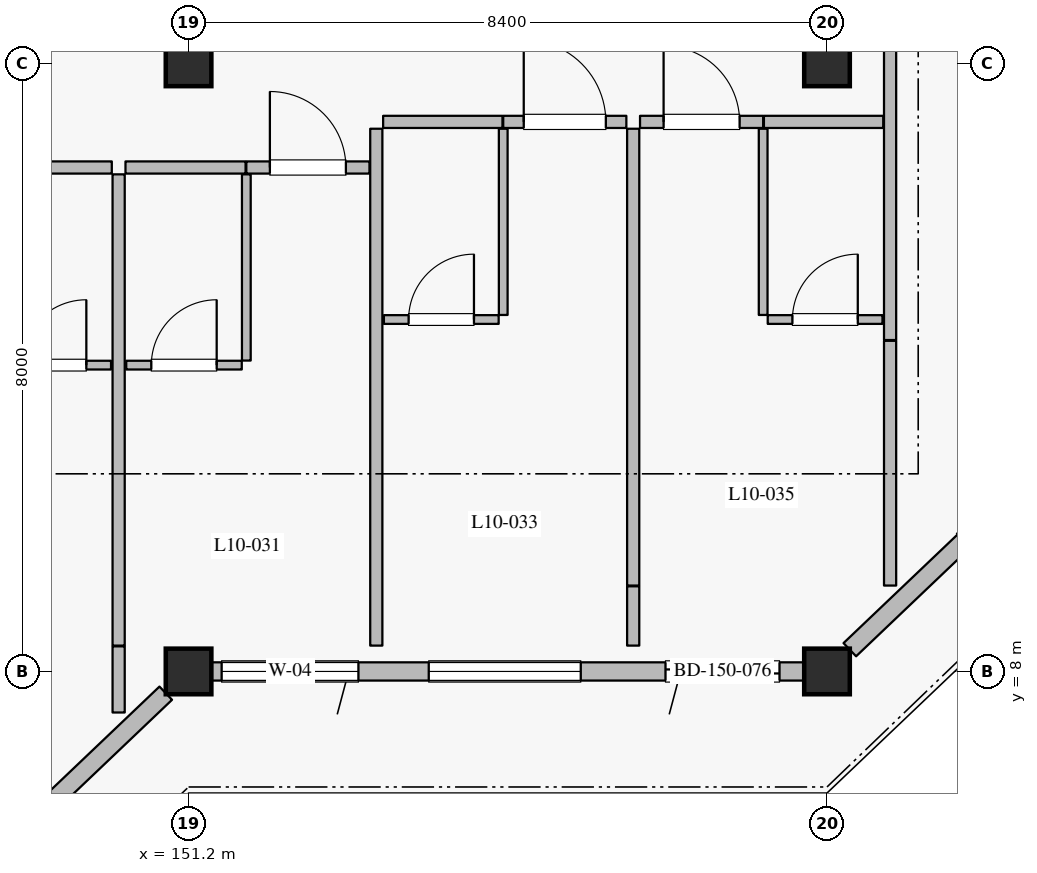
"""IFC4 building model, lengths in metres.
Left out: names, types, materials, properties, quantities, classifications, styles, units other than length and angle.
Written with IfcOpenShell. Run it as: python <this file> out.ifc"""

import sys

from ifc_helpers import new_model, si_unit, direction, frame, frame_2d, origin, origin_2d, place, context, subcontext, project, spatial, rectangle, extrude, element, fill, save


model = new_model("IFC4")
c1 = context("Model", 3, precision=1e-05, world=origin(), true_north=direction((0.0, 1.0)))
c2 = subcontext(c1, "Body", "Model", "MODEL_VIEW")
j1 = project(units=[si_unit("LENGTHUNIT", "METRE"), si_unit("PLANEANGLEUNIT", "RADIAN")], contexts=[c1])
p1 = place(None, origin())
s1 = spatial("IfcSite", under=j1, at=p1, CompositionType="ELEMENT")
p2 = place(p1, origin())
s2 = spatial("IfcBuilding", under=s1, at=p2, CompositionType="ELEMENT")
p3 = place(p2, frame((0.0, 0.0, 43.2)))
s3 = spatial("IfcBuildingStorey", under=s2, at=p3, CompositionType="ELEMENT", Elevation=43.2)
for number, where, z_axis, x_axis in (
    (1, (151.2, 8.0, 0.0), (0.0, 0.0, 1.0), (1.0, 0.0, 0.0)),
    (2, (159.6, 8.0, 0.0), (0.0, 0.0, 1.0), (1.0, 0.0, 0.0)),
    (3, (151.2, 16.0, 0.0), (0.0, 0.0, 1.0), (1.0, 0.0, 0.0)),
    (4, (159.6, 16.0, 0.0), (0.0, 0.0, 1.0), (1.0, 0.0, 0.0)),
):
    element("IfcColumn", number, at=place(p3, frame(where, z_axis=z_axis, x_axis=x_axis)), inside=s3, PredefinedType="COLUMN", context=c2, shape_type="SweptSolid", body=[
        extrude(rectangle(XDim=0.6, YDim=0.6, at=origin_2d()), origin(), (0.0, 0.0, 1.0), 4.2),
    ])
p4 = place(p3, frame((150.9, 7.714, 0.0), z_axis=(0.0, 0.0, 1.0), x_axis=(-0.724145477467, -0.689647248573, 0.0)))
e5 = element("IfcWall", 5, at=p4, inside=s3, PredefinedType="SOLIDWALL", context=c2, shape_type="SweptSolid", body=[
    extrude(rectangle(XDim=10.771, YDim=0.24, at=frame_2d((5.385, 0.0))), origin(), (0.0, 0.0, 1.0), 3.54),
])
p5 = place(p4, frame((2.44, 0.0, 0.0)))
e6 = element("IfcOpeningElement", 6, at=p5, cuts=e5, PredefinedType="OPENING", context=c2, shape_type="SweptSolid", body=[
    extrude(rectangle(XDim=1.5, YDim=2.25, at=frame_2d((0.75, 1.125))), frame((0.0, 0.13, 0.0), z_axis=(0.0, -1.0, 0.0), x_axis=(1.0, 0.0, 0.0)), (0.0, 0.0, 1.0), 0.26),
])
p6 = place(p4, frame((6.857, 0.0, 0.8)))
e7 = element("IfcOpeningElement", 7, at=p6, cuts=e5, PredefinedType="OPENING", context=c2, shape_type="SweptSolid", body=[
    extrude(rectangle(XDim=2.0, YDim=1.75, at=frame_2d((1.0, 0.875))), frame((0.0, 0.13, 0.0), z_axis=(0.0, -1.0, 0.0), x_axis=(1.0, 0.0, 0.0)), (0.0, 0.0, 1.0), 0.26),
])
p7 = place(p3, frame((159.3, 8.0, 0.0), z_axis=(0.0, 0.0, 1.0), x_axis=(-1.0, 0.0, 0.0)))
e8 = element("IfcWall", 8, at=p7, inside=s3, PredefinedType="SOLIDWALL", context=c2, shape_type="SweptSolid", body=[
    extrude(rectangle(XDim=7.8, YDim=0.24, at=frame_2d((3.9, 0.0))), origin(), (0.0, 0.0, 1.0), 3.49),
])
p8 = place(p7, frame((0.325, 0.0, 0.0)))
e9 = element("IfcOpeningElement", 9, at=p8, cuts=e8, PredefinedType="OPENING", context=c2, shape_type="SweptSolid", body=[
    extrude(rectangle(XDim=1.5, YDim=2.25, at=frame_2d((0.75, 1.125))), frame((0.0, 0.13, 0.0), z_axis=(0.0, -1.0, 0.0), x_axis=(1.0, 0.0, 0.0)), (0.0, 0.0, 1.0), 0.26),
])
p9 = place(p7, frame((2.94, 0.0, 0.8)))
e10 = element("IfcOpeningElement", 10, at=p9, cuts=e8, PredefinedType="OPENING", context=c2, shape_type="SweptSolid", body=[
    extrude(rectangle(XDim=2.0, YDim=1.75, at=frame_2d((1.0, 0.875))), frame((0.0, 0.13, 0.0), z_axis=(0.0, -1.0, 0.0), x_axis=(1.0, 0.0, 0.0)), (0.0, 0.0, 1.0), 0.26),
])
p10 = place(p7, frame((5.865, 0.0, 0.8)))
e11 = element("IfcOpeningElement", 11, at=p10, cuts=e8, PredefinedType="OPENING", context=c2, shape_type="SweptSolid", body=[
    extrude(rectangle(XDim=1.8, YDim=1.7, at=frame_2d((0.9, 0.85))), frame((0.0, 0.13, 0.0), z_axis=(0.0, -1.0, 0.0), x_axis=(1.0, 0.0, 0.0)), (0.0, 0.0, 1.0), 0.26),
])
p11 = place(p3, frame((167.7, 15.714, 0.0), z_axis=(0.0, 0.0, 1.0), x_axis=(-0.724156257633, -0.689635928973, 0.0)))
e12 = element("IfcWall", 12, at=p11, inside=s3, PredefinedType="SOLIDWALL", context=c2, shape_type="SweptSolid", body=[
    extrude(rectangle(XDim=10.771, YDim=0.24, at=frame_2d((5.386, 0.0))), origin(), (0.0, 0.0, 1.0), 3.49),
])
p12 = place(p11, frame((2.274, 0.0, 0.0)))
e13 = element("IfcOpeningElement", 13, at=p12, cuts=e12, PredefinedType="OPENING", context=c2, shape_type="SweptSolid", body=[
    extrude(rectangle(XDim=1.5, YDim=2.25, at=frame_2d((0.75, 1.125))), frame((0.0, 0.13, 0.0), z_axis=(0.0, -1.0, 0.0), x_axis=(1.0, 0.0, 0.0)), (0.0, 0.0, 1.0), 0.26),
])
p13 = place(p11, frame((6.699, 0.0, 0.8)))
e14 = element("IfcOpeningElement", 14, at=p13, cuts=e12, PredefinedType="OPENING", context=c2, shape_type="SweptSolid", body=[
    extrude(rectangle(XDim=2.0, YDim=1.75, at=frame_2d((1.0, 0.875))), frame((0.0, 0.13, 0.0), z_axis=(0.0, -1.0, 0.0), x_axis=(1.0, 0.0, 0.0)), (0.0, 0.0, 1.0), 0.26),
])
p14 = place(p3, frame((148.62, 14.63, 0.0), z_axis=(0.0, 0.0, 1.0), x_axis=(1.0, 0.0, 0.0)))
e15 = element("IfcWall", 15, at=p14, inside=s3, PredefinedType="PARTITIONING", context=c2, shape_type="SweptSolid", body=[
    extrude(rectangle(XDim=1.57, YDim=0.16, at=frame_2d((0.785, 0.0))), origin(), (0.0, 0.0, 1.0), 3.935),
])
p15 = place(p3, frame((148.67, 12.03, 0.0), z_axis=(0.0, 0.0, 1.0), x_axis=(1.0, 0.0, 0.0)))
e16 = element("IfcWall", 16, at=p15, inside=s3, PredefinedType="PARTITIONING", context=c2, shape_type="SweptSolid", body=[
    extrude(rectangle(XDim=1.51, YDim=0.115, at=frame_2d((0.755, 0.0))), origin(), (0.0, 0.0, 1.0), 3.935),
])
p16 = place(p15, frame((0.325, 0.0, 0.0)))
e17 = element("IfcOpeningElement", 17, at=p16, cuts=e16, PredefinedType="OPENING", context=c2, shape_type="SweptSolid", body=[
    extrude(rectangle(XDim=0.86, YDim=2.12, at=frame_2d((0.43, 1.06))), frame((0.0, 0.067, 0.0), z_axis=(0.0, -1.0, 0.0), x_axis=(1.0, 0.0, 0.0)), (0.0, 0.0, 1.0), 0.135),
])
p17 = place(p3, frame((150.28, 7.46, 0.0), z_axis=(0.0, 0.0, 1.0), x_axis=(0.0, 1.0, 0.0)))
e18 = element("IfcWall", 18, at=p17, inside=s3, PredefinedType="PARTITIONING", context=c2, shape_type="SweptSolid", body=[
    extrude(rectangle(XDim=0.87, YDim=0.16, at=frame_2d((0.435, 0.0))), origin(), (0.0, 0.0, 1.0), 3.935),
])
p18 = place(p3, frame((150.37, 14.63, 0.0), z_axis=(0.0, 0.0, 1.0), x_axis=(1.0, 0.0, 0.0)))
e19 = element("IfcWall", 19, at=p18, inside=s3, PredefinedType="PARTITIONING", context=c2, shape_type="SweptSolid", body=[
    extrude(rectangle(XDim=1.58, YDim=0.16, at=frame_2d((0.79, 0.0))), origin(), (0.0, 0.0, 1.0), 3.935),
])
p19 = place(p3, frame((151.96, 14.63, 0.0), z_axis=(0.0, 0.0, 1.0), x_axis=(1.0, 0.0, 0.0)))
e20 = element("IfcWall", 20, at=p19, inside=s3, PredefinedType="PARTITIONING", context=c2, shape_type="SweptSolid", body=[
    extrude(rectangle(XDim=1.62, YDim=0.16, at=frame_2d((0.81, 0.0))), origin(), (0.0, 0.0, 1.0), 3.935),
])
p20 = place(p19, frame((0.31, 0.0, 0.0)))
e21 = element("IfcOpeningElement", 21, at=p20, cuts=e20, PredefinedType="OPENING", context=c2, shape_type="SweptSolid", body=[
    extrude(rectangle(XDim=1.0, YDim=2.25, at=frame_2d((0.5, 1.125))), frame((0.0, 0.09, 0.0), z_axis=(0.0, -1.0, 0.0), x_axis=(1.0, 0.0, 0.0)), (0.0, 0.0, 1.0), 0.18),
])
p21 = place(p3, frame((151.96, 12.09, 0.0), z_axis=(0.0, 0.0, 1.0), x_axis=(0.0, 1.0, 0.0)))
e22 = element("IfcWall", 22, at=p21, inside=s3, PredefinedType="PARTITIONING", context=c2, shape_type="SweptSolid", body=[
    extrude(rectangle(XDim=2.45, YDim=0.115, at=frame_2d((1.225, 0.0))), origin(), (0.0, 0.0, 1.0), 3.935),
])
p22 = place(p3, frame((150.38, 12.03, 0.0), z_axis=(0.0, 0.0, 1.0), x_axis=(1.0, 0.0, 0.0)))
e23 = element("IfcWall", 23, at=p22, inside=s3, PredefinedType="PARTITIONING", context=c2, shape_type="SweptSolid", body=[
    extrude(rectangle(XDim=1.52, YDim=0.115, at=frame_2d((0.76, 0.0))), origin(), (0.0, 0.0, 1.0), 3.935),
])
p23 = place(p22, frame((0.33, 0.0, 0.0)))
e24 = element("IfcOpeningElement", 24, at=p23, cuts=e23, PredefinedType="OPENING", context=c2, shape_type="SweptSolid", body=[
    extrude(rectangle(XDim=0.86, YDim=2.12, at=frame_2d((0.43, 1.06))), frame((0.0, 0.067, 0.0), z_axis=(0.0, -1.0, 0.0), x_axis=(1.0, 0.0, 0.0)), (0.0, 0.0, 1.0), 0.135),
])
p24 = place(p3, frame((150.28, 8.34, 0.0), z_axis=(0.0, 0.0, 1.0), x_axis=(0.0, 1.0, 0.0)))
e25 = element("IfcWall", 25, at=p24, inside=s3, PredefinedType="PARTITIONING", context=c2, shape_type="SweptSolid", body=[
    extrude(rectangle(XDim=6.2, YDim=0.16, at=frame_2d((3.1, 0.0))), origin(), (0.0, 0.0, 1.0), 3.935),
])
p25 = place(p3, frame((153.76, 15.23, 0.0), z_axis=(0.0, 0.0, 1.0), x_axis=(1.0, 0.0, 0.0)))
e26 = element("IfcWall", 26, at=p25, inside=s3, PredefinedType="PARTITIONING", context=c2, shape_type="SweptSolid", body=[
    extrude(rectangle(XDim=1.57, YDim=0.16, at=frame_2d((0.785, 0.0))), origin(), (0.0, 0.0, 1.0), 3.935),
])
p26 = place(p3, frame((155.34, 15.23, 0.0), z_axis=(0.0, 0.0, 1.0), x_axis=(1.0, 0.0, 0.0)))
e27 = element("IfcWall", 27, at=p26, inside=s3, PredefinedType="PARTITIONING", context=c2, shape_type="SweptSolid", body=[
    extrude(rectangle(XDim=1.62, YDim=0.16, at=frame_2d((0.81, 0.0))), origin(), (0.0, 0.0, 1.0), 3.935),
])
p27 = place(p26, frame((0.27, 0.0, 0.0)))
e28 = element("IfcOpeningElement", 28, at=p27, cuts=e27, PredefinedType="OPENING", context=c2, shape_type="SweptSolid", body=[
    extrude(rectangle(XDim=1.08, YDim=2.3, at=frame_2d((0.54, 1.15))), frame((0.0, 0.09, 0.0), z_axis=(0.0, -1.0, 0.0), x_axis=(1.0, 0.0, 0.0)), (0.0, 0.0, 1.0), 0.18),
])
p28 = place(p3, frame((155.34, 12.69, 0.0), z_axis=(0.0, 0.0, 1.0), x_axis=(0.0, 1.0, 0.0)))
e29 = element("IfcWall", 29, at=p28, inside=s3, PredefinedType="PARTITIONING", context=c2, shape_type="SweptSolid", body=[
    extrude(rectangle(XDim=2.45, YDim=0.115, at=frame_2d((1.225, 0.0))), origin(), (0.0, 0.0, 1.0), 3.935),
])
p29 = place(p3, frame((153.77, 12.63, 0.0), z_axis=(0.0, 0.0, 1.0), x_axis=(1.0, 0.0, 0.0)))
e30 = element("IfcWall", 30, at=p29, inside=s3, PredefinedType="PARTITIONING", context=c2, shape_type="SweptSolid", body=[
    extrude(rectangle(XDim=1.51, YDim=0.115, at=frame_2d((0.755, 0.0))), origin(), (0.0, 0.0, 1.0), 3.935),
])
p30 = place(p29, frame((0.325, 0.0, 0.0)))
e31 = element("IfcOpeningElement", 31, at=p30, cuts=e30, PredefinedType="OPENING", context=c2, shape_type="SweptSolid", body=[
    extrude(rectangle(XDim=0.86, YDim=2.12, at=frame_2d((0.43, 1.06))), frame((0.0, 0.067, 0.0), z_axis=(0.0, -1.0, 0.0), x_axis=(1.0, 0.0, 0.0)), (0.0, 0.0, 1.0), 0.135),
])
p31 = place(p3, frame((153.67, 8.34, 0.0), z_axis=(0.0, 0.0, 1.0), x_axis=(0.0, 1.0, 0.0)))
e32 = element("IfcWall", 32, at=p31, inside=s3, PredefinedType="PARTITIONING", context=c2, shape_type="SweptSolid", body=[
    extrude(rectangle(XDim=6.8, YDim=0.16, at=frame_2d((3.4, 0.0))), origin(), (0.0, 0.0, 1.0), 3.935),
])
p32 = place(p3, frame((157.05, 8.34, 0.0), z_axis=(0.0, 0.0, 1.0), x_axis=(0.0, 1.0, 0.0)))
e33 = element("IfcWall", 33, at=p32, inside=s3, PredefinedType="PARTITIONING", context=c2, shape_type="SweptSolid", body=[
    extrude(rectangle(XDim=0.78, YDim=0.16, at=frame_2d((0.39, 0.0))), origin(), (0.0, 0.0, 1.0), 3.935),
])
p33 = place(p3, frame((157.14, 15.23, 0.0), z_axis=(0.0, 0.0, 1.0), x_axis=(1.0, 0.0, 0.0)))
e34 = element("IfcWall", 34, at=p33, inside=s3, PredefinedType="PARTITIONING", context=c2, shape_type="SweptSolid", body=[
    extrude(rectangle(XDim=1.62, YDim=0.16, at=frame_2d((0.81, 0.0))), origin(), (0.0, 0.0, 1.0), 3.935),
])
p34 = place(p33, frame((0.31, 0.0, 0.0)))
e35 = element("IfcOpeningElement", 35, at=p34, cuts=e34, PredefinedType="OPENING", context=c2, shape_type="SweptSolid", body=[
    extrude(rectangle(XDim=1.0, YDim=2.25, at=frame_2d((0.5, 1.125))), frame((0.0, 0.09, 0.0), z_axis=(0.0, -1.0, 0.0), x_axis=(1.0, 0.0, 0.0)), (0.0, 0.0, 1.0), 0.18),
])
p35 = place(p3, frame((158.77, 15.23, 0.0), z_axis=(0.0, 0.0, 1.0), x_axis=(1.0, 0.0, 0.0)))
e36 = element("IfcWall", 36, at=p35, inside=s3, PredefinedType="PARTITIONING", context=c2, shape_type="SweptSolid", body=[
    extrude(rectangle(XDim=1.57, YDim=0.16, at=frame_2d((0.785, 0.0))), origin(), (0.0, 0.0, 1.0), 3.935),
])
p36 = place(p3, frame((158.76, 12.69, 0.0), z_axis=(0.0, 0.0, 1.0), x_axis=(0.0, 1.0, 0.0)))
e37 = element("IfcWall", 37, at=p36, inside=s3, PredefinedType="PARTITIONING", context=c2, shape_type="SweptSolid", body=[
    extrude(rectangle(XDim=2.45, YDim=0.115, at=frame_2d((1.225, 0.0))), origin(), (0.0, 0.0, 1.0), 3.935),
])
p37 = place(p3, frame((158.82, 12.63, 0.0), z_axis=(0.0, 0.0, 1.0), x_axis=(1.0, 0.0, 0.0)))
e38 = element("IfcWall", 38, at=p37, inside=s3, PredefinedType="PARTITIONING", context=c2, shape_type="SweptSolid", body=[
    extrude(rectangle(XDim=1.51, YDim=0.115, at=frame_2d((0.755, 0.0))), origin(), (0.0, 0.0, 1.0), 3.935),
])
p38 = place(p37, frame((0.325, 0.0, 0.0)))
e39 = element("IfcOpeningElement", 39, at=p38, cuts=e38, PredefinedType="OPENING", context=c2, shape_type="SweptSolid", body=[
    extrude(rectangle(XDim=0.86, YDim=2.12, at=frame_2d((0.43, 1.06))), frame((0.0, 0.067, 0.0), z_axis=(0.0, -1.0, 0.0), x_axis=(1.0, 0.0, 0.0)), (0.0, 0.0, 1.0), 0.135),
])
p39 = place(p3, frame((157.05, 9.13, 0.0), z_axis=(0.0, 0.0, 1.0), x_axis=(0.0, 1.0, 0.0)))
e40 = element("IfcWall", 40, at=p39, inside=s3, PredefinedType="PARTITIONING", context=c2, shape_type="SweptSolid", body=[
    extrude(rectangle(XDim=6.01, YDim=0.16, at=frame_2d((3.005, 0.0))), origin(), (0.0, 0.0, 1.0), 3.935),
])
p40 = place(p3, frame((160.43, 9.13, 0.0), z_axis=(0.0, 0.0, 1.0), x_axis=(0.0, 1.0, 0.0)))
e41 = element("IfcWall", 41, at=p40, inside=s3, PredefinedType="PARTITIONING", context=c2, shape_type="SweptSolid", body=[
    extrude(rectangle(XDim=3.22, YDim=0.16, at=frame_2d((1.61, 0.0))), origin(), (0.0, 0.0, 1.0), 3.935),
])
p41 = place(p3, frame((160.43, 12.36, 0.0), z_axis=(0.0, 0.0, 1.0), x_axis=(0.0, 1.0, 0.0)))
e42 = element("IfcWall", 42, at=p41, inside=s3, PredefinedType="PARTITIONING", context=c2, shape_type="SweptSolid", body=[
    extrude(rectangle(XDim=9.55, YDim=0.16, at=frame_2d((4.775, 0.0))), origin(), (0.0, 0.0, 1.0), 3.935),
])
p42 = place(p8, origin())
e43 = element("IfcDoor", 43, at=p42, inside=s3, OperationType="SLIDING_TO_LEFT", PredefinedType="DOOR", context=c2, shape_type="SweptSolid", body=[
    extrude(rectangle(XDim=1.5, YDim=2.25, at=frame_2d((0.75, 1.125))), frame((0.0, 0.025, 0.0), z_axis=(0.0, -1.0, 0.0), x_axis=(1.0, 0.0, 0.0)), (0.0, 0.0, 1.0), 0.05),
])
fill(e9, e43)
p43 = place(p9, origin())
e44 = element("IfcWindow", 44, at=p43, inside=s3, PartitioningType="DOUBLE_PANEL_VERTICAL", PredefinedType="WINDOW", context=c2, shape_type="SweptSolid", body=[
    extrude(rectangle(XDim=2.0, YDim=1.75, at=frame_2d((1.0, 0.875))), frame((0.0, 0.03, 0.0), z_axis=(0.0, -1.0, 0.0), x_axis=(1.0, 0.0, 0.0)), (0.0, 0.0, 1.0), 0.06),
])
fill(e10, e44)
p44 = place(p10, origin())
e45 = element("IfcWindow", 45, at=p44, inside=s3, PartitioningType="DOUBLE_PANEL_VERTICAL", PredefinedType="WINDOW", context=c2, shape_type="SweptSolid", body=[
    extrude(rectangle(XDim=1.8, YDim=1.7, at=frame_2d((0.9, 0.85))), frame((0.0, 0.03, 0.0), z_axis=(0.0, -1.0, 0.0), x_axis=(1.0, 0.0, 0.0)), (0.0, 0.0, 1.0), 0.06),
])
fill(e11, e45)
p45 = place(p16, origin())
e46 = element("IfcDoor", 46, at=p45, inside=s3, OperationType="SINGLE_SWING_RIGHT", PredefinedType="DOOR", context=c2, shape_type="SweptSolid", body=[
    extrude(rectangle(XDim=0.86, YDim=2.12, at=frame_2d((0.43, 1.06))), frame((0.0, 0.025, 0.0), z_axis=(0.0, -1.0, 0.0), x_axis=(1.0, 0.0, 0.0)), (0.0, 0.0, 1.0), 0.05),
])
fill(e17, e46)
p46 = place(p20, origin())
e47 = element("IfcDoor", 47, at=p46, inside=s3, OperationType="SINGLE_SWING_LEFT", PredefinedType="DOOR", context=c2, shape_type="SweptSolid", body=[
    extrude(rectangle(XDim=1.0, YDim=2.25, at=frame_2d((0.5, 1.125))), frame((0.0, 0.025, 0.0), z_axis=(0.0, -1.0, 0.0), x_axis=(1.0, 0.0, 0.0)), (0.0, 0.0, 1.0), 0.05),
])
fill(e21, e47)
p47 = place(p23, origin())
e48 = element("IfcDoor", 48, at=p47, inside=s3, OperationType="SINGLE_SWING_RIGHT", PredefinedType="DOOR", context=c2, shape_type="SweptSolid", body=[
    extrude(rectangle(XDim=0.86, YDim=2.12, at=frame_2d((0.43, 1.06))), frame((0.0, 0.025, 0.0), z_axis=(0.0, -1.0, 0.0), x_axis=(1.0, 0.0, 0.0)), (0.0, 0.0, 1.0), 0.05),
])
fill(e24, e48)
p48 = place(p27, origin())
e49 = element("IfcDoor", 49, at=p48, inside=s3, OperationType="SINGLE_SWING_LEFT", PredefinedType="DOOR", context=c2, shape_type="SweptSolid", body=[
    extrude(rectangle(XDim=1.08, YDim=2.3, at=frame_2d((0.54, 1.15))), frame((0.0, 0.025, 0.0), z_axis=(0.0, -1.0, 0.0), x_axis=(1.0, 0.0, 0.0)), (0.0, 0.0, 1.0), 0.05),
])
fill(e28, e49)
p49 = place(p30, origin())
e50 = element("IfcDoor", 50, at=p49, inside=s3, OperationType="SINGLE_SWING_RIGHT", PredefinedType="DOOR", context=c2, shape_type="SweptSolid", body=[
    extrude(rectangle(XDim=0.86, YDim=2.12, at=frame_2d((0.43, 1.06))), frame((0.0, 0.025, 0.0), z_axis=(0.0, -1.0, 0.0), x_axis=(1.0, 0.0, 0.0)), (0.0, 0.0, 1.0), 0.05),
])
fill(e31, e50)
p50 = place(p34, origin())
e51 = element("IfcDoor", 51, at=p50, inside=s3, OperationType="SINGLE_SWING_LEFT", PredefinedType="DOOR", context=c2, shape_type="SweptSolid", body=[
    extrude(rectangle(XDim=1.0, YDim=2.25, at=frame_2d((0.5, 1.125))), frame((0.0, 0.025, 0.0), z_axis=(0.0, -1.0, 0.0), x_axis=(1.0, 0.0, 0.0)), (0.0, 0.0, 1.0), 0.05),
])
fill(e35, e51)
p51 = place(p38, origin())
e52 = element("IfcDoor", 52, at=p51, inside=s3, OperationType="SINGLE_SWING_RIGHT", PredefinedType="DOOR", context=c2, shape_type="SweptSolid", body=[
    extrude(rectangle(XDim=0.86, YDim=2.12, at=frame_2d((0.43, 1.06))), frame((0.0, 0.025, 0.0), z_axis=(0.0, -1.0, 0.0), x_axis=(1.0, 0.0, 0.0)), (0.0, 0.0, 1.0), 0.05),
])
fill(e39, e52)
save(model, sys.argv[1])
